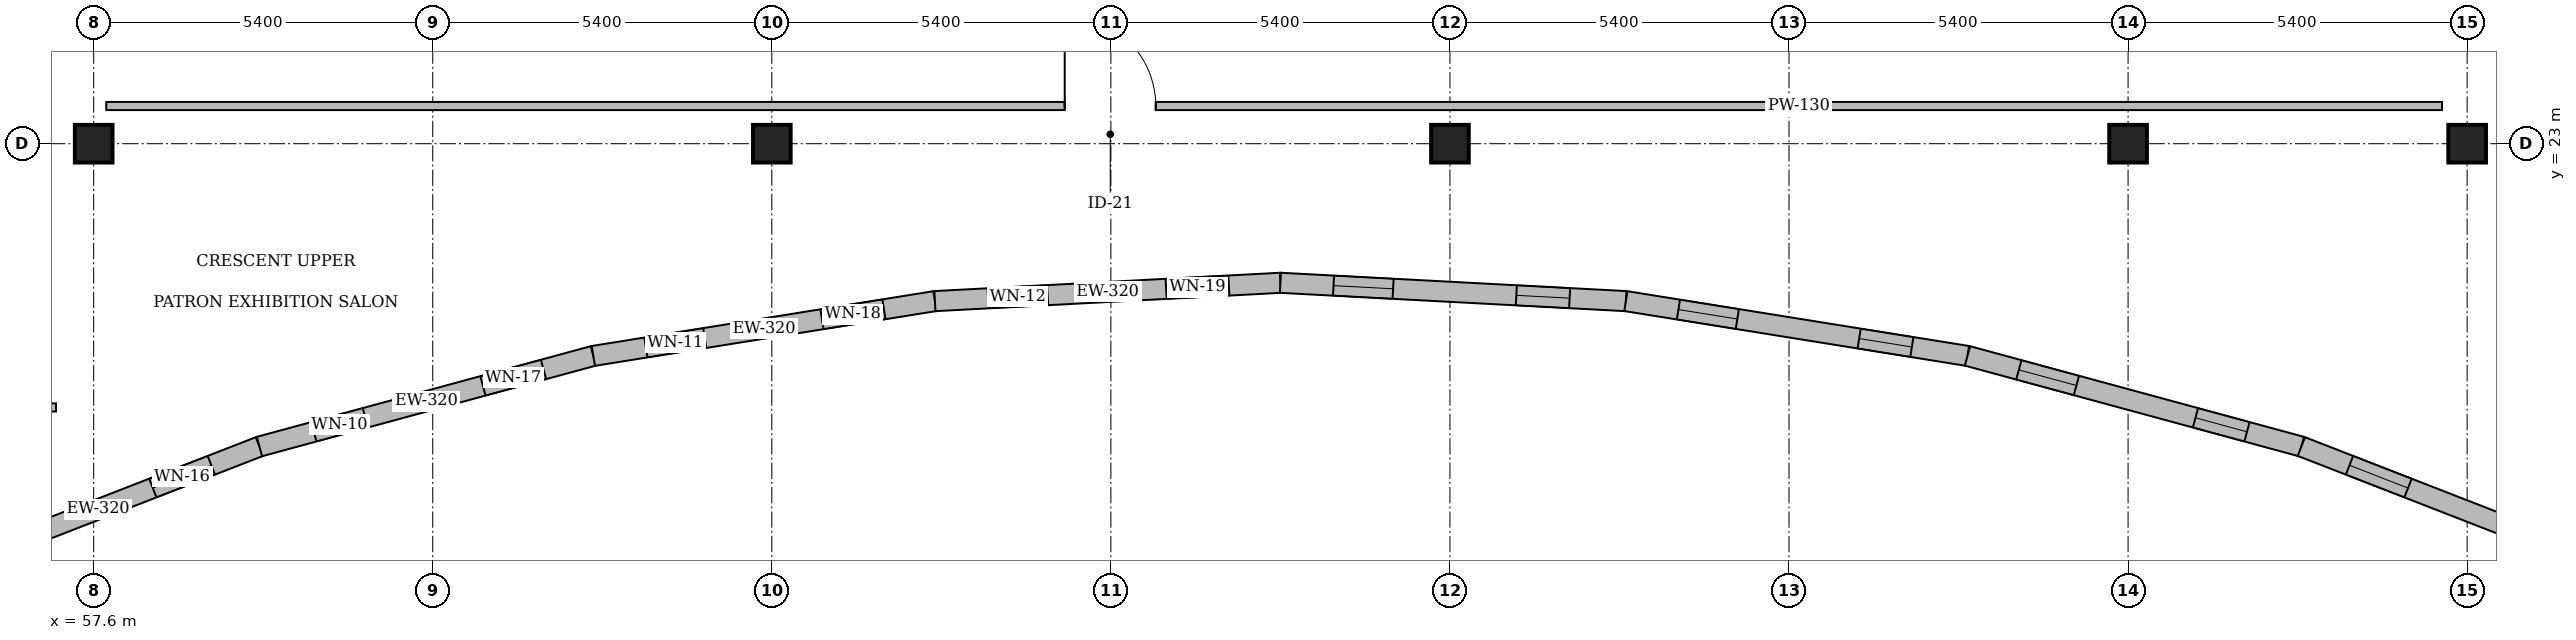
"""IFC4 building model, lengths in metres.
Left out: names, types, materials, properties, quantities, classifications, styles, units other than length and angle.
Written with IfcOpenShell. Run it as: python <this file> out.ifc"""

import sys

from ifc_helpers import new_model, si_unit, direction, frame, frame_2d, origin, origin_2d, place, context, subcontext, project, spatial, rectangle, circle, extrude, element, fill, save


model = new_model("IFC4")
c1 = context("Model", 3, precision=1e-05, world=origin(), true_north=direction((0.0, 1.0)))
c2 = subcontext(c1, "Body", "Model", "MODEL_VIEW")
j1 = project(units=[si_unit("LENGTHUNIT", "METRE"), si_unit("PLANEANGLEUNIT", "RADIAN")], contexts=[c1])
p1 = place(None, origin())
s1 = spatial("IfcSite", under=j1, at=p1, CompositionType="ELEMENT")
p2 = place(p1, origin())
s2 = spatial("IfcBuilding", under=s1, at=p2, CompositionType="ELEMENT")
p3 = place(p2, frame((0.0, 0.0, 9.0)))
s3 = spatial("IfcBuildingStorey", under=s2, at=p3, CompositionType="ELEMENT", Elevation=9.0)
for number, where, z_axis, x_axis in (
    (1, (68.4, 23.0, 0.0), (0.0, 0.0, 1.0), (1.0, 0.0, 0.0)),
    (2, (79.2, 23.0, 0.0), (0.0, 0.0, 1.0), (1.0, 0.0, 0.0)),
    (3, (90.0, 23.0, 0.0), (0.0, 0.0, 1.0), (1.0, 0.0, 0.0)),
    (4, (95.4, 23.0, 0.0), (0.0, 0.0, 1.0), (1.0, 0.0, 0.0)),
    (5, (57.6, 23.0, 0.0), (0.0, 0.0, 1.0), (1.0, 0.0, 0.0)),
):
    element("IfcColumn", number, at=place(p3, frame(where, z_axis=z_axis, x_axis=x_axis)), inside=s3, PredefinedType="COLUMN", context=c2, shape_type="SweptSolid", body=[
        extrude(circle(Radius=0.3, at=origin_2d()), origin(), (0.0, 0.0, 1.0), 4.2),
    ])
p4 = place(p3, frame((55.105, 16.18, 0.0), z_axis=(0.0, 0.0, 1.0), x_axis=(0.931946449517, 0.362595939349, 0.0)))
e6 = element("IfcWall", 6, at=p4, inside=s3, PredefinedType="SOLIDWALL", context=c2, shape_type="SweptSolid", body=[
    extrude(rectangle(XDim=5.51, YDim=0.32, at=frame_2d((2.755, 0.0))), origin(), (0.0, 0.0, 1.0), 4.2),
])
p5 = place(p4, frame((0.897, 0.0, 0.78)))
e7 = element("IfcOpeningElement", 7, at=p5, cuts=e6, PredefinedType="OPENING", context=c2, shape_type="SweptSolid", body=[
    extrude(rectangle(XDim=0.85, YDim=2.25, at=frame_2d((0.425, 1.125))), frame((0.0, 0.18, 0.0), z_axis=(0.0, -1.0, 0.0), x_axis=(1.0, 0.0, 0.0)), (0.0, 0.0, 1.0), 0.36),
])
p6 = place(p4, frame((3.688, 0.0, 0.78)))
e8 = element("IfcOpeningElement", 8, at=p6, cuts=e6, PredefinedType="OPENING", context=c2, shape_type="SweptSolid", body=[
    extrude(rectangle(XDim=1.0, YDim=1.95, at=frame_2d((0.5, 0.975))), frame((0.0, 0.18, 0.0), z_axis=(0.0, -1.0, 0.0), x_axis=(1.0, 0.0, 0.0)), (0.0, 0.0, 1.0), 0.36),
])
p7 = place(p3, frame((60.24, 18.177, 0.0), z_axis=(0.0, 0.0, 1.0), x_axis=(0.965092315166, 0.261909952479, 0.0)))
e9 = element("IfcWall", 9, at=p7, inside=s3, PredefinedType="SOLIDWALL", context=c2, shape_type="SweptSolid", body=[
    extrude(rectangle(XDim=5.51, YDim=0.32, at=frame_2d((2.755, 0.0))), origin(), (0.0, 0.0, 1.0), 4.2),
])
p8 = place(p7, frame((0.897, 0.0, 0.927)))
e10 = element("IfcOpeningElement", 10, at=p8, cuts=e9, PredefinedType="OPENING", context=c2, shape_type="SweptSolid", body=[
    extrude(rectangle(XDim=0.85, YDim=2.35, at=frame_2d((0.425, 1.175))), frame((0.0, 0.18, 0.0), z_axis=(0.0, -1.0, 0.0), x_axis=(1.0, 0.0, 0.0)), (0.0, 0.0, 1.0), 0.36),
])
p9 = place(p7, frame((3.688, 0.0, 0.927)))
e11 = element("IfcOpeningElement", 11, at=p9, cuts=e9, PredefinedType="OPENING", context=c2, shape_type="SweptSolid", body=[
    extrude(rectangle(XDim=1.0, YDim=2.05, at=frame_2d((0.5, 1.025))), frame((0.0, 0.18, 0.0), z_axis=(0.0, -1.0, 0.0), x_axis=(1.0, 0.0, 0.0)), (0.0, 0.0, 1.0), 0.36),
])
p10 = place(p3, frame((65.558, 19.621, 0.0), z_axis=(0.0, 0.0, 1.0), x_axis=(0.9873802806, 0.158367236138, 0.0)))
e12 = element("IfcWall", 12, at=p10, inside=s3, PredefinedType="SOLIDWALL", context=c2, shape_type="SweptSolid", body=[
    extrude(rectangle(XDim=5.51, YDim=0.32, at=frame_2d((2.755, 0.0))), origin(), (0.0, 0.0, 1.0), 4.2),
])
p11 = place(p10, frame((0.847, 0.0, 1.046)))
e13 = element("IfcOpeningElement", 13, at=p11, cuts=e12, PredefinedType="OPENING", context=c2, shape_type="SweptSolid", body=[
    extrude(rectangle(XDim=0.95, YDim=1.9, at=frame_2d((0.475, 0.95))), frame((0.0, 0.18, 0.0), z_axis=(0.0, -1.0, 0.0), x_axis=(1.0, 0.0, 0.0)), (0.0, 0.0, 1.0), 0.36),
])
p12 = place(p10, frame((3.688, 0.0, 1.046)))
e14 = element("IfcOpeningElement", 14, at=p12, cuts=e12, PredefinedType="OPENING", context=c2, shape_type="SweptSolid", body=[
    extrude(rectangle(XDim=1.0, YDim=2.15, at=frame_2d((0.5, 1.075))), frame((0.0, 0.18, 0.0), z_axis=(0.0, -1.0, 0.0), x_axis=(1.0, 0.0, 0.0)), (0.0, 0.0, 1.0), 0.36),
])
p13 = place(p3, frame((70.998, 20.493, 0.0), z_axis=(0.0, 0.0, 1.0), x_axis=(0.998597189501, 0.05294953372, 0.0)))
e15 = element("IfcWall", 15, at=p13, inside=s3, PredefinedType="SOLIDWALL", context=c2, shape_type="SweptSolid", body=[
    extrude(rectangle(XDim=5.51, YDim=0.32, at=frame_2d((2.755, 0.0))), origin(), (0.0, 0.0, 1.0), 4.2),
])
p14 = place(p13, frame((0.847, 0.0, 1.112)))
e16 = element("IfcOpeningElement", 16, at=p14, cuts=e15, PredefinedType="OPENING", context=c2, shape_type="SweptSolid", body=[
    extrude(rectangle(XDim=0.95, YDim=2.0, at=frame_2d((0.475, 1.0))), frame((0.0, 0.18, 0.0), z_axis=(0.0, -1.0, 0.0), x_axis=(1.0, 0.0, 0.0)), (0.0, 0.0, 1.0), 0.36),
])
p15 = place(p13, frame((3.688, 0.0, 1.112)))
e17 = element("IfcOpeningElement", 17, at=p15, cuts=e15, PredefinedType="OPENING", context=c2, shape_type="SweptSolid", body=[
    extrude(rectangle(XDim=1.0, YDim=2.25, at=frame_2d((0.5, 1.125))), frame((0.0, 0.18, 0.0), z_axis=(0.0, -1.0, 0.0), x_axis=(1.0, 0.0, 0.0)), (0.0, 0.0, 1.0), 0.36),
])
p16 = place(p3, frame((76.5, 20.785, 0.0), z_axis=(0.0, 0.0, 1.0), x_axis=(0.998597189501, -0.05294953372, 0.0)))
e18 = element("IfcWall", 18, at=p16, inside=s3, PredefinedType="SOLIDWALL", context=c2, shape_type="SweptSolid", body=[
    extrude(rectangle(XDim=5.51, YDim=0.32, at=frame_2d((2.755, 0.0))), origin(), (0.0, 0.0, 1.0), 4.2),
])
p17 = place(p16, frame((0.847, 0.0, 1.112)))
e19 = element("IfcOpeningElement", 19, at=p17, cuts=e18, PredefinedType="OPENING", context=c2, shape_type="SweptSolid", body=[
    extrude(rectangle(XDim=0.95, YDim=2.1, at=frame_2d((0.475, 1.05))), frame((0.0, 0.18, 0.0), z_axis=(0.0, -1.0, 0.0), x_axis=(1.0, 0.0, 0.0)), (0.0, 0.0, 1.0), 0.36),
])
p18 = place(p16, frame((3.762, 0.0, 1.112)))
e20 = element("IfcOpeningElement", 20, at=p18, cuts=e18, PredefinedType="OPENING", context=c2, shape_type="SweptSolid", body=[
    extrude(rectangle(XDim=0.85, YDim=1.95, at=frame_2d((0.425, 0.975))), frame((0.0, 0.18, 0.0), z_axis=(0.0, -1.0, 0.0), x_axis=(1.0, 0.0, 0.0)), (0.0, 0.0, 1.0), 0.36),
])
p19 = place(p3, frame((82.002, 20.493, 0.0), z_axis=(0.0, 0.0, 1.0), x_axis=(0.9873802806, -0.158367236138, 0.0)))
e21 = element("IfcWall", 21, at=p19, inside=s3, PredefinedType="SOLIDWALL", context=c2, shape_type="SweptSolid", body=[
    extrude(rectangle(XDim=5.51, YDim=0.32, at=frame_2d((2.755, 0.0))), origin(), (0.0, 0.0, 1.0), 4.2),
])
p20 = place(p19, frame((0.847, 0.0, 1.046)))
e22 = element("IfcOpeningElement", 22, at=p20, cuts=e21, PredefinedType="OPENING", context=c2, shape_type="SweptSolid", body=[
    extrude(rectangle(XDim=0.95, YDim=2.2, at=frame_2d((0.475, 1.1))), frame((0.0, 0.18, 0.0), z_axis=(0.0, -1.0, 0.0), x_axis=(1.0, 0.0, 0.0)), (0.0, 0.0, 1.0), 0.36),
])
p21 = place(p19, frame((3.762, 0.0, 1.046)))
e23 = element("IfcOpeningElement", 23, at=p21, cuts=e21, PredefinedType="OPENING", context=c2, shape_type="SweptSolid", body=[
    extrude(rectangle(XDim=0.85, YDim=2.05, at=frame_2d((0.425, 1.025))), frame((0.0, 0.18, 0.0), z_axis=(0.0, -1.0, 0.0), x_axis=(1.0, 0.0, 0.0)), (0.0, 0.0, 1.0), 0.36),
])
p22 = place(p3, frame((87.442, 19.621, 0.0), z_axis=(0.0, 0.0, 1.0), x_axis=(0.965092315166, -0.261909952479, 0.0)))
e24 = element("IfcWall", 24, at=p22, inside=s3, PredefinedType="SOLIDWALL", context=c2, shape_type="SweptSolid", body=[
    extrude(rectangle(XDim=5.51, YDim=0.32, at=frame_2d((2.755, 0.0))), origin(), (0.0, 0.0, 1.0), 4.2),
])
p23 = place(p22, frame((0.847, 0.0, 0.927)))
e25 = element("IfcOpeningElement", 25, at=p23, cuts=e24, PredefinedType="OPENING", context=c2, shape_type="SweptSolid", body=[
    extrude(rectangle(XDim=0.95, YDim=2.3, at=frame_2d((0.475, 1.15))), frame((0.0, 0.18, 0.0), z_axis=(0.0, -1.0, 0.0), x_axis=(1.0, 0.0, 0.0)), (0.0, 0.0, 1.0), 0.36),
])
p24 = place(p22, frame((3.762, 0.0, 0.927)))
e26 = element("IfcOpeningElement", 26, at=p24, cuts=e24, PredefinedType="OPENING", context=c2, shape_type="SweptSolid", body=[
    extrude(rectangle(XDim=0.85, YDim=2.15, at=frame_2d((0.425, 1.075))), frame((0.0, 0.18, 0.0), z_axis=(0.0, -1.0, 0.0), x_axis=(1.0, 0.0, 0.0)), (0.0, 0.0, 1.0), 0.36),
])
p25 = place(p3, frame((92.76, 18.177, 0.0), z_axis=(0.0, 0.0, 1.0), x_axis=(0.931946449517, -0.362595939349, 0.0)))
e27 = element("IfcWall", 27, at=p25, inside=s3, PredefinedType="SOLIDWALL", context=c2, shape_type="SweptSolid", body=[
    extrude(rectangle(XDim=5.51, YDim=0.32, at=frame_2d((2.755, 0.0))), origin(), (0.0, 0.0, 1.0), 4.2),
])
p26 = place(p25, frame((0.823, 0.0, 0.78)))
e28 = element("IfcOpeningElement", 28, at=p26, cuts=e27, PredefinedType="OPENING", context=c2, shape_type="SweptSolid", body=[
    extrude(rectangle(XDim=1.0, YDim=1.95, at=frame_2d((0.5, 0.975))), frame((0.0, 0.18, 0.0), z_axis=(0.0, -1.0, 0.0), x_axis=(1.0, 0.0, 0.0)), (0.0, 0.0, 1.0), 0.36),
])
p27 = place(p25, frame((3.762, 0.0, 0.78)))
e29 = element("IfcOpeningElement", 29, at=p27, cuts=e27, PredefinedType="OPENING", context=c2, shape_type="SweptSolid", body=[
    extrude(rectangle(XDim=0.85, YDim=2.25, at=frame_2d((0.425, 1.125))), frame((0.0, 0.18, 0.0), z_axis=(0.0, -1.0, 0.0), x_axis=(1.0, 0.0, 0.0)), (0.0, 0.0, 1.0), 0.36),
])
p28 = place(p3, frame((57.8, 23.6, 0.0), z_axis=(0.0, 0.0, 1.0), x_axis=(1.0, 0.0, 0.0)))
e30 = element("IfcWall", 30, at=p28, inside=s3, PredefinedType="PARTITIONING", context=c2, shape_type="SweptSolid", body=[
    extrude(rectangle(XDim=37.2, YDim=0.13, at=frame_2d((18.6, 0.0))), origin(), (0.0, 0.0, 1.0), 3.96),
])
p29 = place(p28, frame((15.265, 0.0, 0.0)))
e31 = element("IfcOpeningElement", 31, at=p29, cuts=e30, PredefinedType="OPENING", context=c2, shape_type="SweptSolid", body=[
    extrude(rectangle(XDim=1.45, YDim=2.2, at=frame_2d((0.725, 1.1))), frame((0.0, 0.085, 0.0), z_axis=(0.0, -1.0, 0.0), x_axis=(1.0, 0.0, 0.0)), (0.0, 0.0, 1.0), 0.17),
])
p30 = place(p3, frame((37.0, 18.8, 0.0), z_axis=(0.0, 0.0, 1.0), x_axis=(1.0, 0.0, 0.0)))
e32 = element("IfcWall", 32, at=p30, inside=s3, PredefinedType="PARTITIONING", context=c2, shape_type="SweptSolid", body=[
    extrude(rectangle(XDim=20.0, YDim=0.13, at=frame_2d((10.0, 0.0))), origin(), (0.0, 0.0, 1.0), 3.96),
])
p31 = place(p30, frame((16.96, 0.0, 0.0)))
e33 = element("IfcOpeningElement", 33, at=p31, cuts=e32, PredefinedType="OPENING", context=c2, shape_type="SweptSolid", body=[
    extrude(rectangle(XDim=1.45, YDim=2.2, at=frame_2d((0.725, 1.1))), frame((0.0, 0.085, 0.0), z_axis=(0.0, -1.0, 0.0), x_axis=(1.0, 0.0, 0.0)), (0.0, 0.0, 1.0), 0.17),
])
p32 = place(p6, origin())
e34 = element("IfcWindow", 34, at=p32, inside=s3, PartitioningType="SINGLE_PANEL", PredefinedType="WINDOW", context=c2, shape_type="SweptSolid", body=[
    extrude(rectangle(XDim=1.0, YDim=1.95, at=frame_2d((0.5, 0.975))), frame((0.0, 0.03, 0.0), z_axis=(0.0, -1.0, 0.0), x_axis=(1.0, 0.0, 0.0)), (0.0, 0.0, 1.0), 0.06),
])
fill(e8, e34)
p33 = place(p8, origin())
e35 = element("IfcWindow", 35, at=p33, inside=s3, PartitioningType="SINGLE_PANEL", PredefinedType="WINDOW", context=c2, shape_type="SweptSolid", body=[
    extrude(rectangle(XDim=0.85, YDim=2.35, at=frame_2d((0.425, 1.175))), frame((0.0, 0.03, 0.0), z_axis=(0.0, -1.0, 0.0), x_axis=(1.0, 0.0, 0.0)), (0.0, 0.0, 1.0), 0.06),
])
fill(e10, e35)
p34 = place(p9, origin())
e36 = element("IfcWindow", 36, at=p34, inside=s3, PartitioningType="SINGLE_PANEL", PredefinedType="WINDOW", context=c2, shape_type="SweptSolid", body=[
    extrude(rectangle(XDim=1.0, YDim=2.05, at=frame_2d((0.5, 1.025))), frame((0.0, 0.03, 0.0), z_axis=(0.0, -1.0, 0.0), x_axis=(1.0, 0.0, 0.0)), (0.0, 0.0, 1.0), 0.06),
])
fill(e11, e36)
p35 = place(p11, origin())
e37 = element("IfcWindow", 37, at=p35, inside=s3, PartitioningType="SINGLE_PANEL", PredefinedType="WINDOW", context=c2, shape_type="SweptSolid", body=[
    extrude(rectangle(XDim=0.95, YDim=1.9, at=frame_2d((0.475, 0.95))), frame((0.0, 0.03, 0.0), z_axis=(0.0, -1.0, 0.0), x_axis=(1.0, 0.0, 0.0)), (0.0, 0.0, 1.0), 0.06),
])
fill(e13, e37)
p36 = place(p12, origin())
e38 = element("IfcWindow", 38, at=p36, inside=s3, PartitioningType="SINGLE_PANEL", PredefinedType="WINDOW", context=c2, shape_type="SweptSolid", body=[
    extrude(rectangle(XDim=1.0, YDim=2.15, at=frame_2d((0.5, 1.075))), frame((0.0, 0.03, 0.0), z_axis=(0.0, -1.0, 0.0), x_axis=(1.0, 0.0, 0.0)), (0.0, 0.0, 1.0), 0.06),
])
fill(e14, e38)
p37 = place(p14, origin())
e39 = element("IfcWindow", 39, at=p37, inside=s3, PartitioningType="SINGLE_PANEL", PredefinedType="WINDOW", context=c2, shape_type="SweptSolid", body=[
    extrude(rectangle(XDim=0.95, YDim=2.0, at=frame_2d((0.475, 1.0))), frame((0.0, 0.03, 0.0), z_axis=(0.0, -1.0, 0.0), x_axis=(1.0, 0.0, 0.0)), (0.0, 0.0, 1.0), 0.06),
])
fill(e16, e39)
p38 = place(p15, origin())
e40 = element("IfcWindow", 40, at=p38, inside=s3, PartitioningType="SINGLE_PANEL", PredefinedType="WINDOW", context=c2, shape_type="SweptSolid", body=[
    extrude(rectangle(XDim=1.0, YDim=2.25, at=frame_2d((0.5, 1.125))), frame((0.0, 0.03, 0.0), z_axis=(0.0, -1.0, 0.0), x_axis=(1.0, 0.0, 0.0)), (0.0, 0.0, 1.0), 0.06),
])
fill(e17, e40)
p39 = place(p17, origin())
e41 = element("IfcWindow", 41, at=p39, inside=s3, PartitioningType="SINGLE_PANEL", PredefinedType="WINDOW", context=c2, shape_type="SweptSolid", body=[
    extrude(rectangle(XDim=0.95, YDim=2.1, at=frame_2d((0.475, 1.05))), frame((0.0, 0.03, 0.0), z_axis=(0.0, -1.0, 0.0), x_axis=(1.0, 0.0, 0.0)), (0.0, 0.0, 1.0), 0.06),
])
fill(e19, e41)
p40 = place(p18, origin())
e42 = element("IfcWindow", 42, at=p40, inside=s3, PartitioningType="SINGLE_PANEL", PredefinedType="WINDOW", context=c2, shape_type="SweptSolid", body=[
    extrude(rectangle(XDim=0.85, YDim=1.95, at=frame_2d((0.425, 0.975))), frame((0.0, 0.03, 0.0), z_axis=(0.0, -1.0, 0.0), x_axis=(1.0, 0.0, 0.0)), (0.0, 0.0, 1.0), 0.06),
])
fill(e20, e42)
p41 = place(p20, origin())
e43 = element("IfcWindow", 43, at=p41, inside=s3, PartitioningType="SINGLE_PANEL", PredefinedType="WINDOW", context=c2, shape_type="SweptSolid", body=[
    extrude(rectangle(XDim=0.95, YDim=2.2, at=frame_2d((0.475, 1.1))), frame((0.0, 0.03, 0.0), z_axis=(0.0, -1.0, 0.0), x_axis=(1.0, 0.0, 0.0)), (0.0, 0.0, 1.0), 0.06),
])
fill(e22, e43)
p42 = place(p21, origin())
e44 = element("IfcWindow", 44, at=p42, inside=s3, PartitioningType="SINGLE_PANEL", PredefinedType="WINDOW", context=c2, shape_type="SweptSolid", body=[
    extrude(rectangle(XDim=0.85, YDim=2.05, at=frame_2d((0.425, 1.025))), frame((0.0, 0.03, 0.0), z_axis=(0.0, -1.0, 0.0), x_axis=(1.0, 0.0, 0.0)), (0.0, 0.0, 1.0), 0.06),
])
fill(e23, e44)
p43 = place(p23, origin())
e45 = element("IfcWindow", 45, at=p43, inside=s3, PartitioningType="SINGLE_PANEL", PredefinedType="WINDOW", context=c2, shape_type="SweptSolid", body=[
    extrude(rectangle(XDim=0.95, YDim=2.3, at=frame_2d((0.475, 1.15))), frame((0.0, 0.03, 0.0), z_axis=(0.0, -1.0, 0.0), x_axis=(1.0, 0.0, 0.0)), (0.0, 0.0, 1.0), 0.06),
])
fill(e25, e45)
p44 = place(p24, origin())
e46 = element("IfcWindow", 46, at=p44, inside=s3, PartitioningType="SINGLE_PANEL", PredefinedType="WINDOW", context=c2, shape_type="SweptSolid", body=[
    extrude(rectangle(XDim=0.85, YDim=2.15, at=frame_2d((0.425, 1.075))), frame((0.0, 0.03, 0.0), z_axis=(0.0, -1.0, 0.0), x_axis=(1.0, 0.0, 0.0)), (0.0, 0.0, 1.0), 0.06),
])
fill(e26, e46)
p45 = place(p26, origin())
e47 = element("IfcWindow", 47, at=p45, inside=s3, PartitioningType="SINGLE_PANEL", PredefinedType="WINDOW", context=c2, shape_type="SweptSolid", body=[
    extrude(rectangle(XDim=1.0, YDim=1.95, at=frame_2d((0.5, 0.975))), frame((0.0, 0.03, 0.0), z_axis=(0.0, -1.0, 0.0), x_axis=(1.0, 0.0, 0.0)), (0.0, 0.0, 1.0), 0.06),
])
fill(e28, e47)
p46 = place(p29, origin())
e48 = element("IfcDoor", 48, at=p46, inside=s3, OperationType="DOUBLE_DOOR_SINGLE_SWING", PredefinedType="DOOR", context=c2, shape_type="SweptSolid", body=[
    extrude(rectangle(XDim=1.45, YDim=2.2, at=frame_2d((0.725, 1.1))), frame((0.0, 0.025, 0.0), z_axis=(0.0, -1.0, 0.0), x_axis=(1.0, 0.0, 0.0)), (0.0, 0.0, 1.0), 0.05),
])
fill(e31, e48)
save(model, sys.argv[1])
